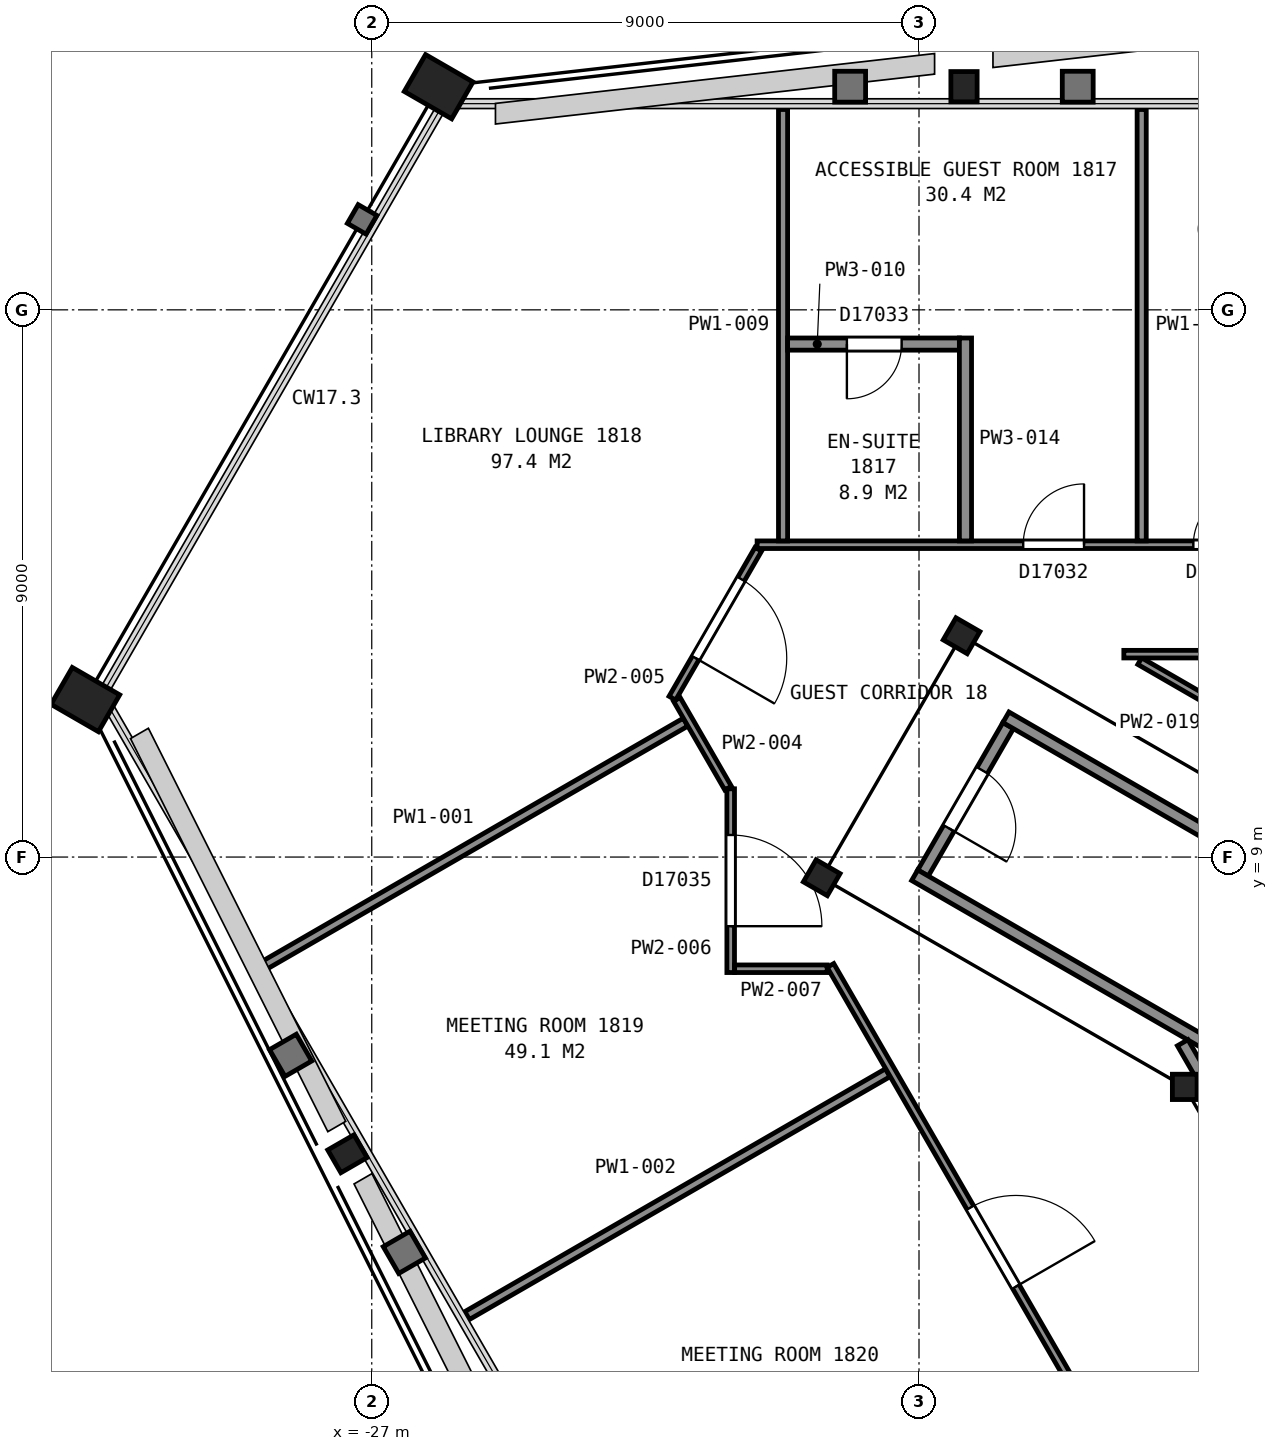
"""IFC4 building model, lengths in metres.
Left out: names, types, materials, properties, quantities, classifications, styles, units other than length and angle.
Written with IfcOpenShell. Run it as: python <this file> out.ifc"""

import sys

from ifc_helpers import new_model, si_unit, direction, frame, frame_2d, origin, origin_2d, place, context, subcontext, project, spatial, rectangle, hollow_rectangle, i_section, extrude, element, fill, save


model = new_model("IFC4")
c1 = context("Model", 3, precision=1e-05, world=origin(), true_north=direction((0.0, 1.0)))
c2 = subcontext(c1, "Body", "Model", "MODEL_VIEW")
j1 = project(units=[si_unit("LENGTHUNIT", "METRE"), si_unit("PLANEANGLEUNIT", "RADIAN")], contexts=[c1])
p1 = place(None, origin())
s1 = spatial("IfcSite", under=j1, at=p1, CompositionType="ELEMENT")
p2 = place(p1, origin())
s2 = spatial("IfcBuilding", under=s1, at=p2, CompositionType="ELEMENT")
p3 = place(p2, frame((0.0, 0.0, 80.0)))
s3 = spatial("IfcBuildingStorey", under=s2, at=p3, CompositionType="ELEMENT", Elevation=80.0)
p4 = place(p3, frame((-17.26, 21.67, 0.0), z_axis=(0.0, 0.0, 1.0), x_axis=(1.0, 0.0, 0.0)))
e1 = element("IfcColumn", 1, at=p4, inside=s3, PredefinedType="COLUMN", context=c2, shape_type="SweptSolid", body=[
    extrude(i_section(OverallWidth=0.432, OverallDepth=0.498, WebThickness=0.056, FlangeThickness=0.089, FilletRadius=0.015, at=origin_2d()), origin(), (0.0, 0.0, 1.0), 3.6),
])
for number, where, z_axis, x_axis in (
    (2, (-25.9, 21.67, 0.0), (0.0, 0.0, 1.0), (0.5, 0.866, 0.0)),
    (3, (-31.71, 11.59, 0.0), (0.0, 0.0, 1.0), (0.5, 0.866, 0.0)),
):
    element("IfcColumn", number, at=place(p3, frame(where, z_axis=z_axis, x_axis=x_axis)), inside=s3, PredefinedType="COLUMN", context=c2, shape_type="SweptSolid", body=[
        extrude(hollow_rectangle(XDim=0.7, YDim=0.9, WallThickness=0.065, at=origin_2d()), origin(), (0.0, 0.0, 1.0), 3.6),
    ])
p5 = place(p3, frame((-27.4, 4.12, 0.0), z_axis=(0.0, 0.0, 1.0), x_axis=(-0.5, 0.866025403784, 0.0)))
e4 = element("IfcColumn", 4, at=p5, inside=s3, PredefinedType="COLUMN", context=c2, shape_type="SweptSolid", body=[
    extrude(i_section(OverallWidth=0.432, OverallDepth=0.498, WebThickness=0.056, FlangeThickness=0.089, FilletRadius=0.015, at=origin_2d()), origin(), (0.0, 0.0, 1.0), 3.6),
])
for number, where, z_axis, x_axis in (
    (5, (-17.3, 12.64, 0.0), (0.0, 0.0, 1.0), (0.5, 0.866, 0.0)),
    (6, (-19.6, 8.66, 0.0), (0.0, 0.0, 1.0), (0.5, 0.866, 0.0)),
):
    element("IfcColumn", number, at=place(p3, frame(where, z_axis=z_axis, x_axis=x_axis)), inside=s3, PredefinedType="COLUMN", context=c2, shape_type="SweptSolid", body=[
        extrude(i_section(OverallWidth=0.419, OverallDepth=0.455, WebThickness=0.042, FlangeThickness=0.068, FilletRadius=0.015, at=origin_2d()), origin(), (0.0, 0.0, 1.0), 3.6),
    ])
p6 = place(p3, frame((-13.63, 5.22, 0.0), z_axis=(0.0, 0.0, 1.0), x_axis=(1.0, 0.0, 0.0)))
e7 = element("IfcColumn", 7, at=p6, inside=s3, PredefinedType="COLUMN", context=c2, shape_type="SweptSolid", body=[
    extrude(i_section(OverallWidth=0.406, OverallDepth=0.417, WebThickness=0.03, FlangeThickness=0.048, FilletRadius=0.015, at=origin_2d()), origin(), (0.0, 0.0, 1.0), 3.6),
])
p7 = place(p3, frame((-16.534, 11.162, 0.0), z_axis=(0.0, 0.0, 1.0), x_axis=(-0.49998411664, -0.866034573852, 0.0)))
e8 = element("IfcWall", 8, at=p7, inside=s3, PredefinedType="PARTITIONING", context=c2, shape_type="SweptSolid", body=[
    extrude(rectangle(XDim=2.8, YDim=0.2, at=frame_2d((1.4, 0.0))), origin(), (0.0, 0.0, 1.0), 3.35),
])
p8 = place(p7, frame((0.85, 0.0, 0.0)))
e9 = element("IfcOpeningElement", 9, at=p8, cuts=e8, PredefinedType="OPENING", context=c2, shape_type="SweptSolid", body=[
    extrude(rectangle(XDim=1.1, YDim=2.1, at=frame_2d((0.55, 1.05))), frame((0.0, 0.11, 0.0), z_axis=(0.0, -1.0, 0.0), x_axis=(1.0, 0.0, 0.0)), (0.0, 0.0, 1.0), 0.22),
])
for number, where, z_axis, x_axis in (
    (10, (-7.678, 2.701, 0.0), (0.0, 0.0, 1.0), (-0.866, 0.5, 0.0)),
    (11, (-6.178, 5.299, 0.0), (0.0, 0.0, 1.0), (-0.866, 0.5, 0.0)),
):
    element("IfcWall", number, at=place(p3, frame(where, z_axis=z_axis, x_axis=x_axis)), inside=s3, PredefinedType="PARTITIONING", context=c2, shape_type="SweptSolid", body=[
        extrude(rectangle(XDim=12.0, YDim=0.2, at=frame_2d((6.0, 0.0))), origin(), (0.0, 0.0, 1.0), 3.35),
    ])
p9 = place(p3, frame((-13.664, 5.946, 0.0), z_axis=(0.0, 0.0, 1.0), x_axis=(0.499994327219, -0.866028678941, 0.0)))
e12 = element("IfcWall", 12, at=p9, inside=s3, PredefinedType="PARTITIONING", context=c2, shape_type="SweptSolid", body=[
    extrude(rectangle(XDim=23.968, YDim=0.2, at=frame_2d((11.984, 0.0))), origin(), (0.0, 0.0, 1.0), 3.35),
])
p10 = place(p3, frame((-28.76, 7.223, 0.0), z_axis=(0.0, 0.0, 1.0), x_axis=(0.866019724796, 0.500009836168, 0.0)))
e13 = element("IfcWall", 13, at=p10, inside=s3, PredefinedType="PARTITIONING", context=c2, shape_type="SweptSolid", body=[
    extrude(rectangle(XDim=7.991, YDim=0.15, at=frame_2d((3.996, 0.0))), origin(), (0.0, 0.0, 1.0), 2.613),
])
p11 = place(p3, frame((-25.432, 1.459, 0.0), z_axis=(0.0, 0.0, 1.0), x_axis=(0.866052736899, 0.499952654668, 0.0)))
e14 = element("IfcWall", 14, at=p11, inside=s3, PredefinedType="PARTITIONING", context=c2, shape_type="SweptSolid", body=[
    extrude(rectangle(XDim=7.987, YDim=0.15, at=frame_2d((3.994, 0.0))), origin(), (0.0, 0.0, 1.0), 2.613),
])
p12 = place(p3, frame((-21.982, 11.594, 0.0), z_axis=(0.0, 0.0, 1.0), x_axis=(0.500048373822, -0.865997473344, 0.0)))
e15 = element("IfcWall", 15, at=p12, inside=s3, PredefinedType="PARTITIONING", context=c2, shape_type="SweptSolid", body=[
    extrude(rectangle(XDim=1.686, YDim=0.125, at=frame_2d((0.843, 0.0))), origin(), (0.0, 0.0, 1.0), 2.613),
])
p13 = place(p3, frame((-22.056, 11.613, 0.0), z_axis=(0.0, 0.0, 1.0), x_axis=(0.499647745683, 0.866228682412, 0.0)))
e16 = element("IfcWall", 16, at=p13, inside=s3, PredefinedType="PARTITIONING", context=c2, shape_type="SweptSolid", body=[
    extrude(rectangle(XDim=2.829, YDim=0.125, at=frame_2d((1.415, 0.0))), origin(), (0.0, 0.0, 1.0), 2.613),
])
p14 = place(p13, frame((0.762, 0.0, 0.0)))
e17 = element("IfcOpeningElement", 17, at=p14, cuts=e16, PredefinedType="OPENING", context=c2, shape_type="SweptSolid", body=[
    extrude(rectangle(XDim=1.5, YDim=2.1, at=frame_2d((0.75, 1.05))), frame((0.0, 0.073, 0.0), z_axis=(0.0, -1.0, 0.0), x_axis=(1.0, 0.0, 0.0)), (0.0, 0.0, 1.0), 0.145),
])
p15 = place(p3, frame((-21.097, 7.101, 0.0), z_axis=(0.0, 0.0, 1.0), x_axis=(0.0, 1.0, 0.0)))
e18 = element("IfcWall", 18, at=p15, inside=s3, PredefinedType="PARTITIONING", context=c2, shape_type="SweptSolid", body=[
    extrude(rectangle(XDim=3.022, YDim=0.125, at=frame_2d((1.511, 0.0))), origin(), (0.0, 0.0, 1.0), 2.613),
])
p16 = place(p15, frame((0.762, 0.0, 0.0)))
e19 = element("IfcOpeningElement", 19, at=p16, cuts=e18, PredefinedType="OPENING", context=c2, shape_type="SweptSolid", body=[
    extrude(rectangle(XDim=1.5, YDim=2.1, at=frame_2d((0.75, 1.05))), frame((0.0, 0.073, 0.0), z_axis=(0.0, -1.0, 0.0), x_axis=(1.0, 0.0, 0.0)), (0.0, 0.0, 1.0), 0.145),
])
p17 = place(p3, frame((-21.032, 7.163, 0.0), z_axis=(0.0, 0.0, 1.0), x_axis=(1.0, 0.0, 0.0)))
e20 = element("IfcWall", 20, at=p17, inside=s3, PredefinedType="PARTITIONING", context=c2, shape_type="SweptSolid", body=[
    extrude(rectangle(XDim=1.522, YDim=0.125, at=frame_2d((0.761, 0.0))), origin(), (0.0, 0.0, 1.0), 2.613),
])
p18 = place(p3, frame((-20.663, 14.137, 0.0), z_axis=(0.0, 0.0, 1.0), x_axis=(1.0, 0.0, 0.0)))
e21 = element("IfcWall", 21, at=p18, inside=s3, PredefinedType="PARTITIONING", context=c2, shape_type="SweptSolid", body=[
    extrude(rectangle(XDim=41.325, YDim=0.125, at=frame_2d((20.663, 0.0))), origin(), (0.0, 0.0, 1.0), 2.613),
])
p19 = place(p18, frame((37.071, 0.0, 0.0)))
e22 = element("IfcOpeningElement", 22, at=p19, cuts=e21, PredefinedType="OPENING", context=c2, shape_type="SweptSolid", body=[
    extrude(rectangle(XDim=0.9, YDim=2.1, at=frame_2d((0.45, 1.05))), frame((0.0, 0.073, 0.0), z_axis=(0.0, -1.0, 0.0), x_axis=(1.0, 0.0, 0.0)), (0.0, 0.0, 1.0), 0.145),
])
p20 = place(p18, frame((34.272, 0.0, 0.0)))
e23 = element("IfcOpeningElement", 23, at=p20, cuts=e21, PredefinedType="OPENING", context=c2, shape_type="SweptSolid", body=[
    extrude(rectangle(XDim=1.0, YDim=2.1, at=frame_2d((0.5, 1.05))), frame((0.0, 0.073, 0.0), z_axis=(0.0, -1.0, 0.0), x_axis=(1.0, 0.0, 0.0)), (0.0, 0.0, 1.0), 0.145),
])
p21 = place(p18, frame((26.496, 0.0, 0.0)))
e24 = element("IfcOpeningElement", 24, at=p21, cuts=e21, PredefinedType="OPENING", context=c2, shape_type="SweptSolid", body=[
    extrude(rectangle(XDim=0.9, YDim=2.1, at=frame_2d((0.45, 1.05))), frame((0.0, 0.073, 0.0), z_axis=(0.0, -1.0, 0.0), x_axis=(1.0, 0.0, 0.0)), (0.0, 0.0, 1.0), 0.145),
])
p22 = place(p18, frame((23.917, 0.0, 0.0)))
e25 = element("IfcOpeningElement", 25, at=p22, cuts=e21, PredefinedType="OPENING", context=c2, shape_type="SweptSolid", body=[
    extrude(rectangle(XDim=0.9, YDim=2.1, at=frame_2d((0.45, 1.05))), frame((0.0, 0.073, 0.0), z_axis=(0.0, -1.0, 0.0), x_axis=(1.0, 0.0, 0.0)), (0.0, 0.0, 1.0), 0.145),
])
p23 = place(p18, frame((16.78, 0.0, 0.0)))
e26 = element("IfcOpeningElement", 26, at=p23, cuts=e21, PredefinedType="OPENING", context=c2, shape_type="SweptSolid", body=[
    extrude(rectangle(XDim=0.9, YDim=2.1, at=frame_2d((0.45, 1.05))), frame((0.0, 0.073, 0.0), z_axis=(0.0, -1.0, 0.0), x_axis=(1.0, 0.0, 0.0)), (0.0, 0.0, 1.0), 0.145),
])
p24 = place(p18, frame((13.952, 0.0, 0.0)))
e27 = element("IfcOpeningElement", 27, at=p24, cuts=e21, PredefinedType="OPENING", context=c2, shape_type="SweptSolid", body=[
    extrude(rectangle(XDim=0.9, YDim=2.1, at=frame_2d((0.45, 1.05))), frame((0.0, 0.073, 0.0), z_axis=(0.0, -1.0, 0.0), x_axis=(1.0, 0.0, 0.0)), (0.0, 0.0, 1.0), 0.145),
])
p25 = place(p18, frame((7.175, 0.0, 0.0)))
e28 = element("IfcOpeningElement", 28, at=p25, cuts=e21, PredefinedType="OPENING", context=c2, shape_type="SweptSolid", body=[
    extrude(rectangle(XDim=0.9, YDim=2.1, at=frame_2d((0.45, 1.05))), frame((0.0, 0.073, 0.0), z_axis=(0.0, -1.0, 0.0), x_axis=(1.0, 0.0, 0.0)), (0.0, 0.0, 1.0), 0.145),
])
p26 = place(p18, frame((4.376, 0.0, 0.0)))
e29 = element("IfcOpeningElement", 29, at=p26, cuts=e21, PredefinedType="OPENING", context=c2, shape_type="SweptSolid", body=[
    extrude(rectangle(XDim=1.0, YDim=2.1, at=frame_2d((0.5, 1.05))), frame((0.0, 0.073, 0.0), z_axis=(0.0, -1.0, 0.0), x_axis=(1.0, 0.0, 0.0)), (0.0, 0.0, 1.0), 0.145),
])
p27 = place(p3, frame((-20.236, 14.199, 0.0), z_axis=(0.0, 0.0, 1.0), x_axis=(0.0, 1.0, 0.0)))
e30 = element("IfcWall", 30, at=p27, inside=s3, PredefinedType="PARTITIONING", context=c2, shape_type="SweptSolid", body=[
    extrude(rectangle(XDim=7.095, YDim=0.15, at=frame_2d((3.548, 0.0))), origin(), (0.0, 0.0, 1.0), 2.613),
])
p28 = place(p3, frame((-17.336, 17.437, 0.0), z_axis=(0.0, 0.0, 1.0), x_axis=(-1.0, 0.0, 0.0)))
e31 = element("IfcWall", 31, at=p28, inside=s3, PredefinedType="PARTITIONING", context=c2, shape_type="SweptSolid", body=[
    extrude(rectangle(XDim=2.825, YDim=0.2, at=frame_2d((1.413, 0.0))), origin(), (0.0, 0.0, 1.0), 2.613),
])
p29 = place(p28, frame((0.95, 0.0, 0.0)))
e32 = element("IfcOpeningElement", 32, at=p29, cuts=e31, PredefinedType="OPENING", context=c2, shape_type="SweptSolid", body=[
    extrude(rectangle(XDim=0.9, YDim=2.1, at=frame_2d((0.45, 1.05))), frame((0.0, 0.11, 0.0), z_axis=(0.0, -1.0, 0.0), x_axis=(1.0, 0.0, 0.0)), (0.0, 0.0, 1.0), 0.22),
])
p30 = place(p3, frame((-3.766, -19.958, 0.0), z_axis=(0.0, 0.0, 1.0), x_axis=(-0.50002170027, 0.866012874765, 0.0)))
e33 = element("IfcWall", 33, at=p30, inside=s3, PredefinedType="PARTITIONING", context=c2, shape_type="SweptSolid", body=[
    extrude(rectangle(XDim=31.379, YDim=0.125, at=frame_2d((15.69, 0.0))), origin(), (0.0, 0.0, 1.0), 2.613),
])
p31 = place(p30, frame((25.28, 0.0, 0.0)))
e34 = element("IfcOpeningElement", 34, at=p31, cuts=e33, PredefinedType="OPENING", context=c2, shape_type="SweptSolid", body=[
    extrude(rectangle(XDim=1.5, YDim=2.1, at=frame_2d((0.75, 1.05))), frame((0.0, 0.073, 0.0), z_axis=(0.0, -1.0, 0.0), x_axis=(1.0, 0.0, 0.0)), (0.0, 0.0, 1.0), 0.145),
])
p32 = place(p30, frame((21.124, 0.0, 0.0)))
e35 = element("IfcOpeningElement", 35, at=p32, cuts=e33, PredefinedType="OPENING", context=c2, shape_type="SweptSolid", body=[
    extrude(rectangle(XDim=0.9, YDim=2.1, at=frame_2d((0.45, 1.05))), frame((0.0, 0.073, 0.0), z_axis=(0.0, -1.0, 0.0), x_axis=(1.0, 0.0, 0.0)), (0.0, 0.0, 1.0), 0.145),
])
p33 = place(p30, frame((14.349, 0.0, 0.0)))
e36 = element("IfcOpeningElement", 36, at=p33, cuts=e33, PredefinedType="OPENING", context=c2, shape_type="SweptSolid", body=[
    extrude(rectangle(XDim=0.9, YDim=2.1, at=frame_2d((0.45, 1.05))), frame((0.0, 0.073, 0.0), z_axis=(0.0, -1.0, 0.0), x_axis=(1.0, 0.0, 0.0)), (0.0, 0.0, 1.0), 0.145),
])
p34 = place(p30, frame((11.804, 0.0, 0.0)))
e37 = element("IfcOpeningElement", 37, at=p34, cuts=e33, PredefinedType="OPENING", context=c2, shape_type="SweptSolid", body=[
    extrude(rectangle(XDim=0.9, YDim=2.1, at=frame_2d((0.45, 1.05))), frame((0.0, 0.073, 0.0), z_axis=(0.0, -1.0, 0.0), x_axis=(1.0, 0.0, 0.0)), (0.0, 0.0, 1.0), 0.145),
])
p35 = place(p30, frame((5.33, 0.0, 0.0)))
e38 = element("IfcOpeningElement", 38, at=p35, cuts=e33, PredefinedType="OPENING", context=c2, shape_type="SweptSolid", body=[
    extrude(rectangle(XDim=0.9, YDim=2.1, at=frame_2d((0.45, 1.05))), frame((0.0, 0.073, 0.0), z_axis=(0.0, -1.0, 0.0), x_axis=(1.0, 0.0, 0.0)), (0.0, 0.0, 1.0), 0.145),
])
p36 = place(p30, frame((2.906, 0.0, 0.0)))
e39 = element("IfcOpeningElement", 39, at=p36, cuts=e33, PredefinedType="OPENING", context=c2, shape_type="SweptSolid", body=[
    extrude(rectangle(XDim=1.0, YDim=2.1, at=frame_2d((0.5, 1.05))), frame((0.0, 0.073, 0.0), z_axis=(0.0, -1.0, 0.0), x_axis=(1.0, 0.0, 0.0)), (0.0, 0.0, 1.0), 0.145),
])
p37 = place(p3, frame((-17.236, 14.199, 0.0), z_axis=(0.0, 0.0, 1.0), x_axis=(0.0, 1.0, 0.0)))
e40 = element("IfcWall", 40, at=p37, inside=s3, PredefinedType="PARTITIONING", context=c2, shape_type="SweptSolid", body=[
    extrude(rectangle(XDim=3.338, YDim=0.2, at=frame_2d((1.669, 0.0))), origin(), (0.0, 0.0, 1.0), 2.613),
])
p38 = place(p3, frame((-14.37, 12.222, 0.0), z_axis=(0.0, 0.0, 1.0), x_axis=(0.866063239147, -0.499934461503, 0.0)))
e41 = element("IfcWall", 41, at=p38, inside=s3, PredefinedType="PARTITIONING", context=c2, shape_type="SweptSolid", body=[
    extrude(rectangle(XDim=2.359, YDim=0.125, at=frame_2d((1.18, 0.0))), origin(), (0.0, 0.0, 1.0), 2.613),
])
p39 = place(p3, frame((-14.632, 12.337, 0.0), z_axis=(0.0, 0.0, 1.0), x_axis=(1.0, 0.0, 0.0)))
e42 = element("IfcWall", 42, at=p39, inside=s3, PredefinedType="PARTITIONING", context=c2, shape_type="SweptSolid", body=[
    extrude(rectangle(XDim=29.263, YDim=0.125, at=frame_2d((14.632, 0.0))), origin(), (0.0, 0.0, 1.0), 2.613),
])
p40 = place(p3, frame((-14.338, 14.199, 0.0), z_axis=(0.0, 0.0, 1.0), x_axis=(0.0, 1.0, 0.0)))
e43 = element("IfcWall", 43, at=p40, inside=s3, PredefinedType="PARTITIONING", context=c2, shape_type="SweptSolid", body=[
    extrude(rectangle(XDim=7.095, YDim=0.15, at=frame_2d((3.548, 0.0))), origin(), (0.0, 0.0, 1.0), 2.613),
])
p41 = place(p8, origin())
e44 = element("IfcDoor", 44, at=p41, inside=s3, OperationType="SINGLE_SWING_RIGHT", PredefinedType="DOOR", context=c2, shape_type="SweptSolid", body=[
    extrude(rectangle(XDim=1.1, YDim=2.1, at=frame_2d((0.55, 1.05))), frame((0.0, 0.025, 0.0), z_axis=(0.0, -1.0, 0.0), x_axis=(1.0, 0.0, 0.0)), (0.0, 0.0, 1.0), 0.05),
])
fill(e9, e44)
p42 = place(p14, origin())
e45 = element("IfcDoor", 45, at=p42, inside=s3, OperationType="DOUBLE_DOOR_SINGLE_SWING", PredefinedType="DOOR", context=c2, shape_type="SweptSolid", body=[
    extrude(rectangle(XDim=1.5, YDim=2.1, at=frame_2d((0.75, 1.05))), frame((0.0, 0.025, 0.0), z_axis=(0.0, -1.0, 0.0), x_axis=(1.0, 0.0, 0.0)), (0.0, 0.0, 1.0), 0.05),
])
fill(e17, e45)
p43 = place(p16, origin())
e46 = element("IfcDoor", 46, at=p43, inside=s3, OperationType="DOUBLE_DOOR_SINGLE_SWING", PredefinedType="DOOR", context=c2, shape_type="SweptSolid", body=[
    extrude(rectangle(XDim=1.5, YDim=2.1, at=frame_2d((0.75, 1.05))), frame((0.0, 0.025, 0.0), z_axis=(0.0, -1.0, 0.0), x_axis=(1.0, 0.0, 0.0)), (0.0, 0.0, 1.0), 0.05),
])
fill(e19, e46)
p44 = place(p25, origin())
e47 = element("IfcDoor", 47, at=p44, inside=s3, OperationType="SINGLE_SWING_RIGHT", PredefinedType="DOOR", context=c2, shape_type="SweptSolid", body=[
    extrude(rectangle(XDim=0.9, YDim=2.1, at=frame_2d((0.45, 1.05))), frame((0.0, 0.025, 0.0), z_axis=(0.0, -1.0, 0.0), x_axis=(1.0, 0.0, 0.0)), (0.0, 0.0, 1.0), 0.05),
])
fill(e28, e47)
p45 = place(p26, origin())
e48 = element("IfcDoor", 48, at=p45, inside=s3, OperationType="SINGLE_SWING_RIGHT", PredefinedType="DOOR", context=c2, shape_type="SweptSolid", body=[
    extrude(rectangle(XDim=1.0, YDim=2.1, at=frame_2d((0.5, 1.05))), frame((0.0, 0.025, 0.0), z_axis=(0.0, -1.0, 0.0), x_axis=(1.0, 0.0, 0.0)), (0.0, 0.0, 1.0), 0.05),
])
fill(e29, e48)
p46 = place(p29, origin())
e49 = element("IfcDoor", 49, at=p46, inside=s3, OperationType="SINGLE_SWING_RIGHT", PredefinedType="DOOR", context=c2, shape_type="SweptSolid", body=[
    extrude(rectangle(XDim=0.9, YDim=2.1, at=frame_2d((0.45, 1.05))), frame((0.0, 0.025, 0.0), z_axis=(0.0, -1.0, 0.0), x_axis=(1.0, 0.0, 0.0)), (0.0, 0.0, 1.0), 0.05),
])
fill(e32, e49)
p47 = place(p31, origin())
e50 = element("IfcDoor", 50, at=p47, inside=s3, OperationType="DOUBLE_DOOR_SINGLE_SWING", PredefinedType="DOOR", context=c2, shape_type="SweptSolid", body=[
    extrude(rectangle(XDim=1.5, YDim=2.1, at=frame_2d((0.75, 1.05))), frame((0.0, 0.025, 0.0), z_axis=(0.0, -1.0, 0.0), x_axis=(1.0, 0.0, 0.0)), (0.0, 0.0, 1.0), 0.05),
])
fill(e34, e50)
save(model, sys.argv[1])
